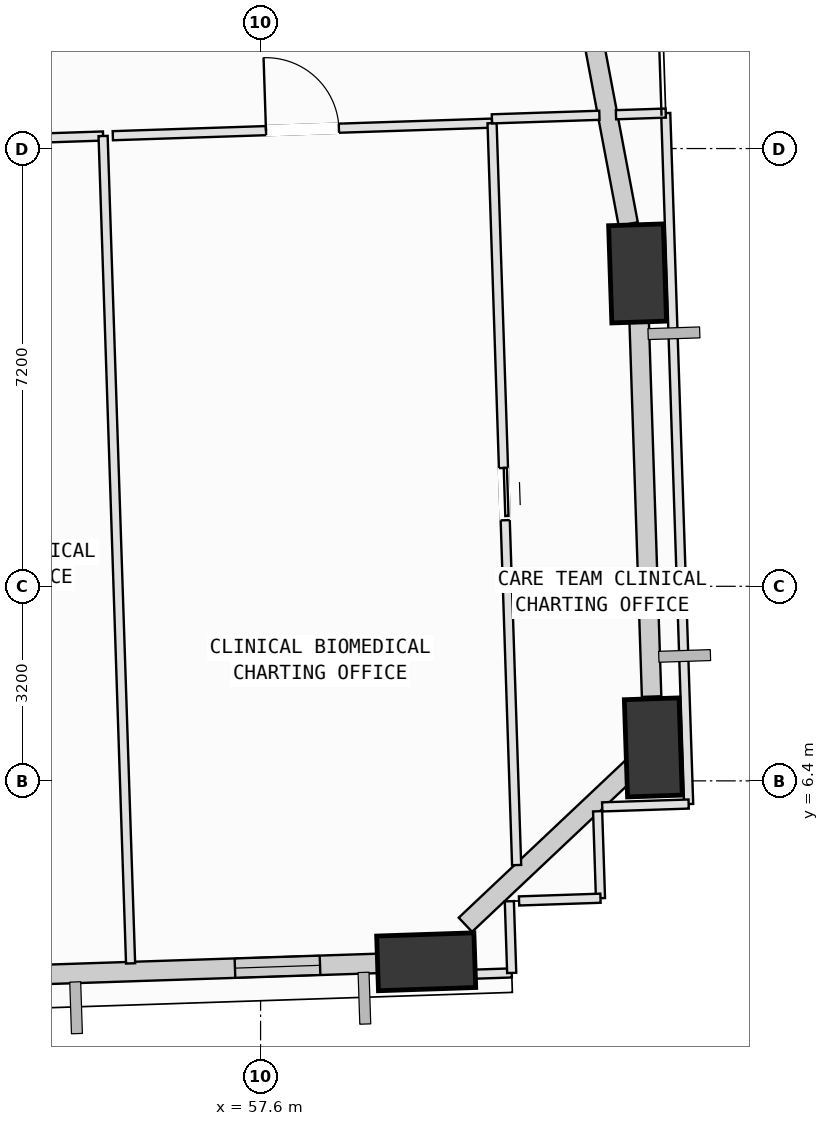
"""IFC4 building model, lengths in metres.
Left out: names, types, materials, properties, quantities, classifications, styles, units other than length and angle.
Written with IfcOpenShell. Run it as: python <this file> out.ifc"""

import sys

from ifc_helpers import new_model, si_unit, direction, frame, frame_2d, origin, origin_2d, place, context, subcontext, project, spatial, rectangle, extrude, element, fill, save


model = new_model("IFC4")
c1 = context("Model", 3, precision=1e-05, world=origin(), true_north=direction((0.0, 1.0)))
c2 = subcontext(c1, "Body", "Model", "MODEL_VIEW")
j1 = project(units=[si_unit("LENGTHUNIT", "METRE"), si_unit("PLANEANGLEUNIT", "RADIAN")], contexts=[c1])
p1 = place(None, origin())
s1 = spatial("IfcSite", under=j1, at=p1, CompositionType="ELEMENT")
p2 = place(p1, origin())
s2 = spatial("IfcBuilding", under=s1, at=p2, CompositionType="ELEMENT")
p3 = place(p2, frame((0.0, 0.0, 31.0)))
s3 = spatial("IfcBuildingStorey", under=s2, at=p3, CompositionType="ELEMENT", Elevation=31.0)
p4 = place(p3, frame((53.127, 3.186, 0.002), z_axis=(0.088301732814, 0.081084764267, 0.99278802621), x_axis=(-0.700238789355, 0.713897639235, 0.003974742434)))
e1 = element("IfcColumn", 1, at=p4, inside=s3, PredefinedType="COLUMN", context=c2, shape_type="SweptSolid", body=[
    extrude(rectangle(XDim=1.6, YDim=0.9, at=origin_2d()), origin(), (0.0, 0.0, 1.0), 4.026),
])
p5 = place(p3, frame((60.323, 3.425, 0.002), z_axis=(0.086851898184, 0.110379327428, 0.990087446571), x_axis=(-0.805751774541, 0.592235082356, 0.00465672101)))
e2 = element("IfcColumn", 2, at=p5, inside=s3, PredefinedType="COLUMN", context=c2, shape_type="SweptSolid", body=[
    extrude(rectangle(XDim=1.6, YDim=0.9, at=origin_2d()), origin(), (0.0, 0.0, 1.0), 4.037),
])
p6 = place(p3, frame((64.059, 6.95, 0.002), z_axis=(0.072169528096, 0.125541130532, 0.989459945505), x_axis=(-0.464116659071, -0.873870563102, 0.144727211392)))
e3 = element("IfcColumn", 3, at=p6, inside=s3, PredefinedType="COLUMN", context=c2, shape_type="SweptSolid", body=[
    extrude(rectangle(XDim=1.6, YDim=0.9, at=origin_2d()), origin(), (0.0, 0.0, 1.0), 4.039),
])
p7 = place(p3, frame((63.8, 14.746, 0.002), z_axis=(0.040274338788, 0.124396228377, 0.991414926255), x_axis=(-0.273662155981, -0.952906802327, 0.130681484771)))
e4 = element("IfcColumn", 4, at=p7, inside=s3, PredefinedType="COLUMN", context=c2, shape_type="SweptSolid", body=[
    extrude(rectangle(XDim=1.6, YDim=0.9, at=origin_2d()), origin(), (0.0, 0.0, 1.0), 4.031),
])
p8 = place(p3, frame((59.938, 3.412, 0.0), z_axis=(0.0, 0.0, 1.0), x_axis=(-0.999450050227, -0.033160173418, 0.0)))
e5 = element("IfcWall", 5, at=p8, inside=s3, PredefinedType="SOLIDWALL", context=c2, shape_type="SweptSolid", body=[
    extrude(rectangle(XDim=6.045, YDim=0.32, at=frame_2d((3.022, 0.0))), origin(), (0.0, 0.0, 1.0), 2.865),
])
p9 = place(p8, frame((1.361, 0.0, 0.75)))
e6 = element("IfcOpeningElement", 6, at=p9, cuts=e5, PredefinedType="OPENING", context=c2, shape_type="SweptSolid", body=[
    extrude(rectangle(XDim=1.4, YDim=1.85, at=frame_2d((0.7, 0.925))), frame((0.0, 0.17, 0.0), z_axis=(0.0, -1.0, 0.0), x_axis=(1.0, 0.0, 0.0)), (0.0, 0.0, 1.0), 0.34),
])
p10 = place(p3, frame((63.825, 6.729, 0.0), z_axis=(0.0, 0.0, 1.0), x_axis=(-0.727201022691, -0.686424557105, 0.0)))
e7 = element("IfcWall", 7, at=p10, inside=s3, PredefinedType="SOLIDWALL", context=c2, shape_type="SweptSolid", body=[
    extrude(rectangle(XDim=3.928, YDim=0.32, at=frame_2d((1.964, 0.0))), origin(), (0.0, 0.0, 1.0), 3.165),
])
p11 = place(p3, frame((63.812, 14.393, 0.0), z_axis=(0.0, 0.0, 1.0), x_axis=(0.033130361489, -0.999451038895, 0.0)))
e8 = element("IfcWall", 8, at=p11, inside=s3, PredefinedType="SOLIDWALL", context=c2, shape_type="SweptSolid", body=[
    extrude(rectangle(XDim=6.61, YDim=0.32, at=frame_2d((3.305, 0.0))), origin(), (0.0, 0.0, 1.0), 3.165),
])
p12 = place(p3, frame((62.049, 24.022, 0.0), z_axis=(0.0, 0.0, 1.0), x_axis=(0.185503389707, -0.982643624315, 0.0)))
e9 = element("IfcWall", 9, at=p12, inside=s3, PredefinedType="SOLIDWALL", context=c2, shape_type="SweptSolid", body=[
    extrude(rectangle(XDim=8.614, YDim=0.32, at=frame_2d((4.307, 0.0))), origin(), (0.0, 0.0, 1.0), 3.165),
])
p13 = place(p3, frame((50.673, 16.862, 0.0), z_axis=(0.0, 0.0, 1.0), x_axis=(0.999448896244, 0.03319493632, 0.0)))
e10 = element("IfcWall", 10, at=p13, inside=s3, PredefinedType="PARTITIONING", context=c2, shape_type="SweptSolid", body=[
    extrude(rectangle(XDim=4.339, YDim=0.15, at=frame_2d((2.17, 0.0))), origin(), (0.0, 0.0, 1.0), 3.78),
])
p14 = place(p13, frame((1.57, 0.0, 0.0)))
e11 = element("IfcOpeningElement", 11, at=p14, cuts=e10, PredefinedType="OPENING", context=c2, shape_type="SweptSolid", body=[
    extrude(rectangle(XDim=1.2, YDim=2.15, at=frame_2d((0.6, 1.075))), frame((0.0, 0.085, 0.0), z_axis=(0.0, -1.0, 0.0), x_axis=(1.0, 0.0, 0.0)), (0.0, 0.0, 1.0), 0.17),
])
p15 = place(p3, frame((55.01, 17.006, 0.0), z_axis=(0.0, 0.0, 1.0), x_axis=(0.033190050186, -0.999449058516, 0.0)))
e12 = element("IfcWall", 12, at=p15, inside=s3, PredefinedType="PARTITIONING", context=c2, shape_type="SweptSolid", body=[
    extrude(rectangle(XDim=13.616, YDim=0.15, at=frame_2d((6.808, 0.0))), origin(), (0.0, 0.0, 1.0), 3.78),
])
p16 = place(p3, frame((61.73, 3.241, 0.0), z_axis=(0.0, 0.0, 1.0), x_axis=(-0.999452019089, -0.033100778516, 0.0)))
e13 = element("IfcWall", 13, at=p16, inside=s3, PredefinedType="PARTITIONING", context=c2, shape_type="SweptSolid", body=[
    extrude(rectangle(XDim=1.785, YDim=0.15, at=frame_2d((0.893, 0.0))), origin(), (0.0, 0.0, 1.0), 3.78),
])
p17 = place(p3, frame((55.17, 17.011, 0.0), z_axis=(0.0, 0.0, 1.0), x_axis=(0.999449543268, 0.033175449669, 0.0)))
e14 = element("IfcWall", 14, at=p17, inside=s3, PredefinedType="PARTITIONING", context=c2, shape_type="SweptSolid", body=[
    extrude(rectangle(XDim=6.24, YDim=0.15, at=frame_2d((3.12, 0.0))), origin(), (0.0, 0.0, 1.0), 3.78),
])
p18 = place(p17, frame((2.52, 0.0, 0.0)))
e15 = element("IfcOpeningElement", 15, at=p18, cuts=e14, PredefinedType="OPENING", context=c2, shape_type="SweptSolid", body=[
    extrude(rectangle(XDim=1.2, YDim=2.15, at=frame_2d((0.6, 1.075))), frame((0.0, 0.085, 0.0), z_axis=(0.0, -1.0, 0.0), x_axis=(1.0, 0.0, 0.0)), (0.0, 0.0, 1.0), 0.17),
])
p19 = place(p3, frame((61.407, 17.218, 0.0), z_axis=(0.0, 0.0, 1.0), x_axis=(0.033092460537, -0.999452294537, 0.0)))
e16 = element("IfcWall", 16, at=p19, inside=s3, PredefinedType="PARTITIONING", context=c2, shape_type="SweptSolid", body=[
    extrude(rectangle(XDim=12.21, YDim=0.15, at=frame_2d((6.105, 0.0))), origin(), (0.0, 0.0, 1.0), 3.78),
])
p20 = place(p19, frame((5.675, 0.0, 0.0)))
e17 = element("IfcOpeningElement", 17, at=p20, cuts=e16, PredefinedType="OPENING", context=c2, shape_type="SweptSolid", body=[
    extrude(rectangle(XDim=0.86, YDim=2.06, at=frame_2d((0.43, 1.03))), frame((0.0, 0.085, 0.0), z_axis=(0.0, -1.0, 0.0), x_axis=(1.0, 0.0, 0.0)), (0.0, 0.0, 1.0), 0.17),
])
p21 = place(p3, frame((61.691, 4.42, 0.0), z_axis=(0.0, 0.0, 1.0), x_axis=(0.033114981937, -0.999451548586, 0.0)))
e18 = element("IfcWall", 18, at=p21, inside=s3, PredefinedType="PARTITIONING", context=c2, shape_type="SweptSolid", body=[
    extrude(rectangle(XDim=1.18, YDim=0.15, at=frame_2d((0.59, 0.0))), origin(), (0.0, 0.0, 1.0), 3.78),
])
p22 = place(p3, frame((64.263, 17.383, 0.0), z_axis=(0.0, 0.0, 1.0), x_axis=(0.033152539768, -0.99945030347, 0.0)))
e19 = element("IfcWall", 19, at=p22, inside=s3, PredefinedType="PARTITIONING", context=c2, shape_type="SweptSolid", body=[
    extrude(rectangle(XDim=11.37, YDim=0.15, at=frame_2d((5.685, 0.0))), origin(), (0.0, 0.0, 1.0), 3.165),
])
p23 = place(p3, frame((64.64, 6.019, 0.0), z_axis=(0.0, 0.0, 1.0), x_axis=(-0.999450610136, -0.033143293429, 0.0)))
e20 = element("IfcWall", 20, at=p23, inside=s3, PredefinedType="PARTITIONING", context=c2, shape_type="SweptSolid", body=[
    extrude(rectangle(XDim=1.422, YDim=0.15, at=frame_2d((0.711, 0.0))), origin(), (0.0, 0.0, 1.0), 3.78),
])
p24 = place(p3, frame((63.143, 5.9, 0.0), z_axis=(0.0, 0.0, 1.0), x_axis=(0.032763687936, -0.99946312626, 0.0)))
e21 = element("IfcWall", 21, at=p24, inside=s3, PredefinedType="PARTITIONING", context=c2, shape_type="SweptSolid", body=[
    extrude(rectangle(XDim=1.431, YDim=0.15, at=frame_2d((0.715, 0.0))), origin(), (0.0, 0.0, 1.0), 3.78),
])
p25 = place(p3, frame((63.19, 4.47, 0.0), z_axis=(0.0, 0.0, 1.0), x_axis=(-0.999437601352, -0.033533282029, 0.0)))
e22 = element("IfcWall", 22, at=p25, inside=s3, PredefinedType="PARTITIONING", context=c2, shape_type="SweptSolid", body=[
    extrude(rectangle(XDim=1.34, YDim=0.15, at=frame_2d((0.67, 0.0))), origin(), (0.0, 0.0, 1.0), 3.78),
])
p26 = place(p3, frame((61.405, 17.288, 0.0), z_axis=(0.0, 0.0, 1.0), x_axis=(0.999446132346, 0.033278048894, 0.0)))
e23 = element("IfcWall", 23, at=p26, inside=s3, PredefinedType="PARTITIONING", context=c2, shape_type="SweptSolid", body=[
    extrude(rectangle(XDim=1.768, YDim=0.15, at=frame_2d((0.884, 0.0))), origin(), (0.0, 0.0, 1.0), 3.78),
])
p27 = place(p3, frame((63.445, 17.356, 0.0), z_axis=(0.0, 0.0, 1.0), x_axis=(0.999451509735, 0.033116154502, 0.0)))
e24 = element("IfcWall", 24, at=p27, inside=s3, PredefinedType="PARTITIONING", context=c2, shape_type="SweptSolid", body=[
    extrude(rectangle(XDim=0.818, YDim=0.15, at=frame_2d((0.409, 0.0))), origin(), (0.0, 0.0, 1.0), 3.78),
])
p28 = place(p9, origin())
e25 = element("IfcWindow", 25, at=p28, inside=s3, PartitioningType="SINGLE_PANEL", PredefinedType="WINDOW", context=c2, shape_type="SweptSolid", body=[
    extrude(rectangle(XDim=1.4, YDim=1.85, at=frame_2d((0.7, 0.925))), frame((0.0, 0.03, 0.0), z_axis=(0.0, -1.0, 0.0), x_axis=(1.0, 0.0, 0.0)), (0.0, 0.0, 1.0), 0.06),
])
fill(e6, e25)
p29 = place(p18, origin())
e26 = element("IfcDoor", 26, at=p29, inside=s3, OperationType="SINGLE_SWING_LEFT", PredefinedType="DOOR", context=c2, shape_type="SweptSolid", body=[
    extrude(rectangle(XDim=1.2, YDim=2.15, at=frame_2d((0.6, 1.075))), frame((0.0, 0.025, 0.0), z_axis=(0.0, -1.0, 0.0), x_axis=(1.0, 0.0, 0.0)), (0.0, 0.0, 1.0), 0.05),
])
fill(e15, e26)
p30 = place(p20, origin())
e27 = element("IfcDoor", 27, at=p30, inside=s3, OperationType="SLIDING_TO_LEFT", PredefinedType="DOOR", context=c2, shape_type="SweptSolid", body=[
    extrude(rectangle(XDim=0.86, YDim=2.06, at=frame_2d((0.43, 1.03))), frame((0.0, 0.025, 0.0), z_axis=(0.0, -1.0, 0.0), x_axis=(1.0, 0.0, 0.0)), (0.0, 0.0, 1.0), 0.05),
])
fill(e17, e27)
save(model, sys.argv[1])
